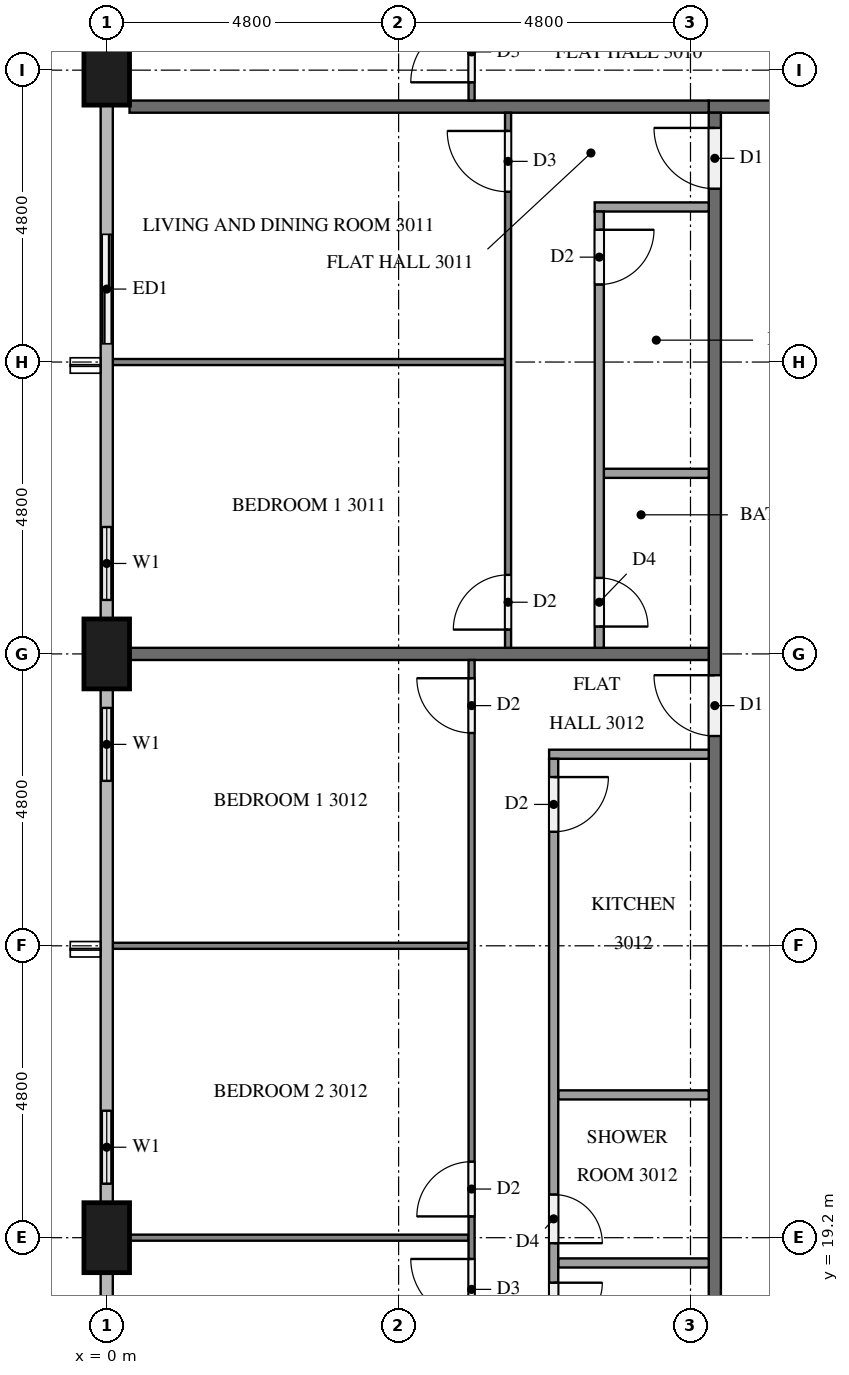
"""IFC4 building model, lengths in metres.
Left out: names, types, materials, properties, quantities, classifications, styles, units other than length and angle.
Written with IfcOpenShell. Run it as: python <this file> out.ifc"""

import sys

from ifc_helpers import new_model, si_unit, direction, frame, frame_2d, origin, origin_2d, place, context, subcontext, project, spatial, rectangle, extrude, element, fill, save


model = new_model("IFC4")
c1 = context("Model", 3, precision=1e-05, world=origin(), true_north=direction((0.0, 1.0)))
c2 = subcontext(c1, "Body", "Model", "MODEL_VIEW")
j1 = project(units=[si_unit("LENGTHUNIT", "METRE"), si_unit("PLANEANGLEUNIT", "RADIAN")], contexts=[c1])
p1 = place(None, origin())
s1 = spatial("IfcSite", under=j1, at=p1, CompositionType="ELEMENT")
p2 = place(p1, origin())
s2 = spatial("IfcBuilding", under=s1, at=p2, CompositionType="ELEMENT")
p3 = place(p2, frame((0.0, 0.0, 119.1)))
s3 = spatial("IfcBuildingStorey", under=s2, at=p3, CompositionType="ELEMENT", Elevation=119.1)
for number, where, z_axis, x_axis in (
    (1, (0.0, 38.4, 0.0), (0.0, 0.0, 1.0), (0.0, 1.0, 0.0)),
    (2, (0.0, 28.8, 0.0), (0.0, 0.0, 1.0), (0.0, 1.0, 0.0)),
    (3, (0.0, 19.2, 0.0), (0.0, 0.0, 1.0), (0.0, 1.0, 0.0)),
):
    element("IfcColumn", number, at=place(p3, frame(where, z_axis=z_axis, x_axis=x_axis)), inside=s3, PredefinedType="COLUMN", context=c2, shape_type="SweptSolid", body=[
        extrude(rectangle(XDim=1.15, YDim=0.75, at=origin_2d()), origin(), (0.0, 0.0, 1.0), 3.2),
    ])
p4 = place(p3, frame((0.0, 36.0, 0.0), z_axis=(0.0, 0.0, 1.0), x_axis=(0.0, -1.0, 0.0)))
e4 = element("IfcWall", 4, at=p4, inside=s3, PredefinedType="SOLIDWALL", context=c2, shape_type="SweptSolid", body=[
    extrude(rectangle(XDim=2.4, YDim=0.15, at=frame_2d((1.2, 0.0))), origin(), (0.0, 0.0, 1.0), 3.2),
])
p5 = place(p4, frame((0.3, 0.0, 0.0)))
e5 = element("IfcOpeningElement", 5, at=p5, cuts=e4, PredefinedType="OPENING", context=c2, shape_type="SweptSolid", body=[
    extrude(rectangle(XDim=1.8, YDim=2.4, at=frame_2d((0.9, 1.2))), frame((0.0, 0.085, 0.0), z_axis=(0.0, -1.0, 0.0), x_axis=(1.0, 0.0, 0.0)), (0.0, 0.0, 1.0), 0.17),
])
p6 = place(p3, frame((0.0, 31.2, 0.0), z_axis=(0.0, 0.0, 1.0), x_axis=(0.0, -1.0, 0.0)))
e6 = element("IfcWall", 6, at=p6, inside=s3, PredefinedType="SOLIDWALL", context=c2, shape_type="SweptSolid", body=[
    extrude(rectangle(XDim=1.825, YDim=0.15, at=frame_2d((0.913, 0.0))), origin(), (0.0, 0.0, 1.0), 3.2),
])
p7 = place(p6, frame((0.312, 0.0, 0.9)))
e7 = element("IfcOpeningElement", 7, at=p7, cuts=e6, PredefinedType="OPENING", context=c2, shape_type="SweptSolid", body=[
    extrude(rectangle(XDim=1.2, YDim=1.4, at=frame_2d((0.6, 0.7))), frame((0.0, 0.085, 0.0), z_axis=(0.0, -1.0, 0.0), x_axis=(1.0, 0.0, 0.0)), (0.0, 0.0, 1.0), 0.17),
])
p8 = place(p3, frame((0.0, 28.225, 0.0), z_axis=(0.0, 0.0, 1.0), x_axis=(0.0, -1.0, 0.0)))
e8 = element("IfcWall", 8, at=p8, inside=s3, PredefinedType="SOLIDWALL", context=c2, shape_type="SweptSolid", body=[
    extrude(rectangle(XDim=1.825, YDim=0.15, at=frame_2d((0.913, 0.0))), origin(), (0.0, 0.0, 1.0), 3.2),
])
p9 = place(p8, frame((0.312, 0.0, 0.9)))
e9 = element("IfcOpeningElement", 9, at=p9, cuts=e8, PredefinedType="OPENING", context=c2, shape_type="SweptSolid", body=[
    extrude(rectangle(XDim=1.2, YDim=1.4, at=frame_2d((0.6, 0.7))), frame((0.0, 0.085, 0.0), z_axis=(0.0, -1.0, 0.0), x_axis=(1.0, 0.0, 0.0)), (0.0, 0.0, 1.0), 0.17),
])
p10 = place(p3, frame((0.0, 21.6, 0.0), z_axis=(0.0, 0.0, 1.0), x_axis=(0.0, -1.0, 0.0)))
e10 = element("IfcWall", 10, at=p10, inside=s3, PredefinedType="SOLIDWALL", context=c2, shape_type="SweptSolid", body=[
    extrude(rectangle(XDim=1.825, YDim=0.15, at=frame_2d((0.913, 0.0))), origin(), (0.0, 0.0, 1.0), 3.2),
])
p11 = place(p10, frame((0.312, 0.0, 0.9)))
e11 = element("IfcOpeningElement", 11, at=p11, cuts=e10, PredefinedType="OPENING", context=c2, shape_type="SweptSolid", body=[
    extrude(rectangle(XDim=1.2, YDim=1.4, at=frame_2d((0.6, 0.7))), frame((0.0, 0.085, 0.0), z_axis=(0.0, -1.0, 0.0), x_axis=(1.0, 0.0, 0.0)), (0.0, 0.0, 1.0), 0.17),
])
p12 = place(p3, frame((12.1, 37.8, 0.0), z_axis=(0.0, 0.0, 1.0), x_axis=(-1.0, 0.0, 0.0)))
e12 = element("IfcWall", 12, at=p12, inside=s3, PredefinedType="PARTITIONING", context=c2, shape_type="SweptSolid", body=[
    extrude(rectangle(XDim=2.2, YDim=0.2, at=frame_2d((1.1, 0.0))), origin(), (0.0, 0.0, 1.0), 3.2),
])
p13 = place(p3, frame((10.0, 15.1, 0.0), z_axis=(0.0, 0.0, 1.0), x_axis=(0.0, 1.0, 0.0)))
e13 = element("IfcWall", 13, at=p13, inside=s3, PredefinedType="PARTITIONING", context=c2, shape_type="SweptSolid", body=[
    extrude(rectangle(XDim=22.6, YDim=0.2, at=frame_2d((11.3, 0.0))), origin(), (0.0, 0.0, 1.0), 3.2),
])
p14 = place(p13, frame((21.35, 0.0, 0.0)))
e14 = element("IfcOpeningElement", 14, at=p14, cuts=e13, PredefinedType="OPENING", context=c2, shape_type="SweptSolid", body=[
    extrude(rectangle(XDim=1.0, YDim=2.1, at=frame_2d((0.5, 1.05))), frame((0.0, 0.11, 0.0), z_axis=(0.0, -1.0, 0.0), x_axis=(1.0, 0.0, 0.0)), (0.0, 0.0, 1.0), 0.22),
])
p15 = place(p13, frame((12.35, 0.0, 0.0)))
e15 = element("IfcOpeningElement", 15, at=p15, cuts=e13, PredefinedType="OPENING", context=c2, shape_type="SweptSolid", body=[
    extrude(rectangle(XDim=1.0, YDim=2.1, at=frame_2d((0.5, 1.05))), frame((0.0, 0.11, 0.0), z_axis=(0.0, -1.0, 0.0), x_axis=(1.0, 0.0, 0.0)), (0.0, 0.0, 1.0), 0.22),
])
for number, where, z_axis, x_axis in (
    (16, (0.375, 37.8, 0.0), (0.0, 0.0, 1.0), (1.0, 0.0, 0.0)),
    (17, (0.375, 28.8, 0.0), (0.0, 0.0, 1.0), (1.0, 0.0, 0.0)),
):
    element("IfcWall", number, at=place(p3, frame(where, z_axis=z_axis, x_axis=x_axis)), inside=s3, PredefinedType="PARTITIONING", context=c2, shape_type="SweptSolid", body=[
        extrude(rectangle(XDim=9.525, YDim=0.2, at=frame_2d((4.762, 0.0))), origin(), (0.0, 0.0, 1.0), 3.2),
    ])
p16 = place(p3, frame((6.0, 37.9, 0.0), z_axis=(0.0, 0.0, 1.0), x_axis=(0.0, 1.0, 0.0)))
e18 = element("IfcWall", 18, at=p16, inside=s3, PredefinedType="PARTITIONING", context=c2, shape_type="SweptSolid", body=[
    extrude(rectangle(XDim=14.8, YDim=0.1, at=frame_2d((7.4, 0.0))), origin(), (0.0, 0.0, 1.0), 3.2),
])
p17 = place(p16, frame((0.3, 0.0, 0.0)))
e19 = element("IfcOpeningElement", 19, at=p17, cuts=e18, PredefinedType="OPENING", context=c2, shape_type="SweptSolid", body=[
    extrude(rectangle(XDim=1.0, YDim=2.1, at=frame_2d((0.5, 1.05))), frame((0.0, 0.06, 0.0), z_axis=(0.0, -1.0, 0.0), x_axis=(1.0, 0.0, 0.0)), (0.0, 0.0, 1.0), 0.12),
])
p18 = place(p16, frame((8.85, 0.0, 0.0)))
e20 = element("IfcOpeningElement", 20, at=p18, cuts=e18, PredefinedType="OPENING", context=c2, shape_type="SweptSolid", body=[
    extrude(rectangle(XDim=0.9, YDim=2.1, at=frame_2d((0.45, 1.05))), frame((0.0, 0.06, 0.0), z_axis=(0.0, -1.0, 0.0), x_axis=(1.0, 0.0, 0.0)), (0.0, 0.0, 1.0), 0.12),
])
p19 = place(p16, frame((10.45, 0.0, 0.0)))
e21 = element("IfcOpeningElement", 21, at=p19, cuts=e18, PredefinedType="OPENING", context=c2, shape_type="SweptSolid", body=[
    extrude(rectangle(XDim=0.9, YDim=2.1, at=frame_2d((0.45, 1.05))), frame((0.0, 0.06, 0.0), z_axis=(0.0, -1.0, 0.0), x_axis=(1.0, 0.0, 0.0)), (0.0, 0.0, 1.0), 0.12),
])
p20 = place(p3, frame((6.55, 33.6, 0.0), z_axis=(0.0, 0.0, 1.0), x_axis=(-1.0, 0.0, 0.0)))
e22 = element("IfcWall", 22, at=p20, inside=s3, PredefinedType="PARTITIONING", context=c2, shape_type="SweptSolid", body=[
    extrude(rectangle(XDim=6.45, YDim=0.1, at=frame_2d((3.225, 0.0))), origin(), (0.0, 0.0, 1.0), 3.2),
])
p21 = place(p3, frame((6.6, 28.9, 0.0), z_axis=(0.0, 0.0, 1.0), x_axis=(0.0, 1.0, 0.0)))
e23 = element("IfcWall", 23, at=p21, inside=s3, PredefinedType="PARTITIONING", context=c2, shape_type="SweptSolid", body=[
    extrude(rectangle(XDim=8.8, YDim=0.1, at=frame_2d((4.4, 0.0))), origin(), (0.0, 0.0, 1.0), 3.2),
])
p22 = place(p21, frame((7.5, 0.0, 0.0)))
e24 = element("IfcOpeningElement", 24, at=p22, cuts=e23, PredefinedType="OPENING", context=c2, shape_type="SweptSolid", body=[
    extrude(rectangle(XDim=1.0, YDim=2.1, at=frame_2d((0.5, 1.05))), frame((0.0, 0.06, 0.0), z_axis=(0.0, -1.0, 0.0), x_axis=(1.0, 0.0, 0.0)), (0.0, 0.0, 1.0), 0.12),
])
p23 = place(p21, frame((0.3, 0.0, 0.0)))
e25 = element("IfcOpeningElement", 25, at=p23, cuts=e23, PredefinedType="OPENING", context=c2, shape_type="SweptSolid", body=[
    extrude(rectangle(XDim=0.9, YDim=2.1, at=frame_2d((0.45, 1.05))), frame((0.0, 0.06, 0.0), z_axis=(0.0, -1.0, 0.0), x_axis=(1.0, 0.0, 0.0)), (0.0, 0.0, 1.0), 0.12),
])
p24 = place(p3, frame((9.9, 31.77, 0.0), z_axis=(0.0, 0.0, 1.0), x_axis=(-1.0, 0.0, 0.0)))
e26 = element("IfcWall", 26, at=p24, inside=s3, PredefinedType="PARTITIONING", context=c2, shape_type="SweptSolid", body=[
    extrude(rectangle(XDim=1.725, YDim=0.15, at=frame_2d((0.862, 0.0))), origin(), (0.0, 0.0, 1.0), 3.2),
])
p25 = place(p3, frame((9.9, 36.15, 0.0), z_axis=(0.0, 0.0, 1.0), x_axis=(-1.0, 0.0, 0.0)))
e27 = element("IfcWall", 27, at=p25, inside=s3, PredefinedType="PARTITIONING", context=c2, shape_type="SweptSolid", body=[
    extrude(rectangle(XDim=1.875, YDim=0.15, at=frame_2d((0.938, 0.0))), origin(), (0.0, 0.0, 1.0), 3.2),
])
p26 = place(p3, frame((8.1, 36.075, 0.0), z_axis=(0.0, 0.0, 1.0), x_axis=(0.0, -1.0, 0.0)))
e28 = element("IfcWall", 28, at=p26, inside=s3, PredefinedType="PARTITIONING", context=c2, shape_type="SweptSolid", body=[
    extrude(rectangle(XDim=7.175, YDim=0.15, at=frame_2d((3.587, 0.0))), origin(), (0.0, 0.0, 1.0), 3.2),
])
p27 = place(p26, frame((0.3, 0.0, 0.0)))
e29 = element("IfcOpeningElement", 29, at=p27, cuts=e28, PredefinedType="OPENING", context=c2, shape_type="SweptSolid", body=[
    extrude(rectangle(XDim=0.9, YDim=2.1, at=frame_2d((0.45, 1.05))), frame((0.0, 0.085, 0.0), z_axis=(0.0, -1.0, 0.0), x_axis=(1.0, 0.0, 0.0)), (0.0, 0.0, 1.0), 0.17),
])
p28 = place(p26, frame((6.025, 0.0, 0.0)))
e30 = element("IfcOpeningElement", 30, at=p28, cuts=e28, PredefinedType="OPENING", context=c2, shape_type="SweptSolid", body=[
    extrude(rectangle(XDim=0.8, YDim=2.1, at=frame_2d((0.4, 1.05))), frame((0.0, 0.085, 0.0), z_axis=(0.0, -1.0, 0.0), x_axis=(1.0, 0.0, 0.0)), (0.0, 0.0, 1.0), 0.17),
])
p29 = place(p3, frame((5.95, 24.0, 0.0), z_axis=(0.0, 0.0, 1.0), x_axis=(-1.0, 0.0, 0.0)))
e31 = element("IfcWall", 31, at=p29, inside=s3, PredefinedType="PARTITIONING", context=c2, shape_type="SweptSolid", body=[
    extrude(rectangle(XDim=5.85, YDim=0.1, at=frame_2d((2.925, 0.0))), origin(), (0.0, 0.0, 1.0), 3.2),
])
p30 = place(p3, frame((5.95, 19.2, 0.0), z_axis=(0.0, 0.0, 1.0), x_axis=(-1.0, 0.0, 0.0)))
e32 = element("IfcWall", 32, at=p30, inside=s3, PredefinedType="PARTITIONING", context=c2, shape_type="SweptSolid", body=[
    extrude(rectangle(XDim=5.575, YDim=0.1, at=frame_2d((2.788, 0.0))), origin(), (0.0, 0.0, 1.0), 3.2),
])
p31 = place(p3, frame((6.0, 15.1, 0.0), z_axis=(0.0, 0.0, 1.0), x_axis=(0.0, 1.0, 0.0)))
e33 = element("IfcWall", 33, at=p31, inside=s3, PredefinedType="PARTITIONING", context=c2, shape_type="SweptSolid", body=[
    extrude(rectangle(XDim=13.6, YDim=0.1, at=frame_2d((6.8, 0.0))), origin(), (0.0, 0.0, 1.0), 3.2),
])
p32 = place(p31, frame((12.4, 0.0, 0.0)))
e34 = element("IfcOpeningElement", 34, at=p32, cuts=e33, PredefinedType="OPENING", context=c2, shape_type="SweptSolid", body=[
    extrude(rectangle(XDim=0.9, YDim=2.1, at=frame_2d((0.45, 1.05))), frame((0.0, 0.06, 0.0), z_axis=(0.0, -1.0, 0.0), x_axis=(1.0, 0.0, 0.0)), (0.0, 0.0, 1.0), 0.12),
])
p33 = place(p31, frame((4.45, 0.0, 0.0)))
e35 = element("IfcOpeningElement", 35, at=p33, cuts=e33, PredefinedType="OPENING", context=c2, shape_type="SweptSolid", body=[
    extrude(rectangle(XDim=0.9, YDim=2.1, at=frame_2d((0.45, 1.05))), frame((0.0, 0.06, 0.0), z_axis=(0.0, -1.0, 0.0), x_axis=(1.0, 0.0, 0.0)), (0.0, 0.0, 1.0), 0.12),
])
p34 = place(p31, frame((2.75, 0.0, 0.0)))
e36 = element("IfcOpeningElement", 36, at=p34, cuts=e33, PredefinedType="OPENING", context=c2, shape_type="SweptSolid", body=[
    extrude(rectangle(XDim=1.0, YDim=2.1, at=frame_2d((0.5, 1.05))), frame((0.0, 0.06, 0.0), z_axis=(0.0, -1.0, 0.0), x_axis=(1.0, 0.0, 0.0)), (0.0, 0.0, 1.0), 0.12),
])
for number, where, z_axis, x_axis in (
    (37, (9.9, 21.548, 0.0), (0.0, 0.0, 1.0), (-1.0, 0.0, 0.0)),
    (38, (9.9, 18.785, 0.0), (0.0, 0.0, 1.0), (-1.0, 0.0, 0.0)),
):
    element("IfcWall", number, at=place(p3, frame(where, z_axis=z_axis, x_axis=x_axis)), inside=s3, PredefinedType="PARTITIONING", context=c2, shape_type="SweptSolid", body=[
        extrude(rectangle(XDim=2.475, YDim=0.15, at=frame_2d((1.237, 0.0))), origin(), (0.0, 0.0, 1.0), 3.2),
    ])
p35 = place(p3, frame((9.9, 27.15, 0.0), z_axis=(0.0, 0.0, 1.0), x_axis=(-1.0, 0.0, 0.0)))
e39 = element("IfcWall", 39, at=p35, inside=s3, PredefinedType="PARTITIONING", context=c2, shape_type="SweptSolid", body=[
    extrude(rectangle(XDim=2.625, YDim=0.15, at=frame_2d((1.312, 0.0))), origin(), (0.0, 0.0, 1.0), 3.2),
])
p36 = place(p3, frame((7.35, 27.075, 0.0), z_axis=(0.0, 0.0, 1.0), x_axis=(0.0, -1.0, 0.0)))
e40 = element("IfcWall", 40, at=p36, inside=s3, PredefinedType="PARTITIONING", context=c2, shape_type="SweptSolid", body=[
    extrude(rectangle(XDim=11.975, YDim=0.15, at=frame_2d((5.987, 0.0))), origin(), (0.0, 0.0, 1.0), 3.2),
])
p37 = place(p36, frame((0.3, 0.0, 0.0)))
e41 = element("IfcOpeningElement", 41, at=p37, cuts=e40, PredefinedType="OPENING", context=c2, shape_type="SweptSolid", body=[
    extrude(rectangle(XDim=0.9, YDim=2.1, at=frame_2d((0.45, 1.05))), frame((0.0, 0.085, 0.0), z_axis=(0.0, -1.0, 0.0), x_axis=(1.0, 0.0, 0.0)), (0.0, 0.0, 1.0), 0.17),
])
p38 = place(p36, frame((7.165, 0.0, 0.0)))
e42 = element("IfcOpeningElement", 42, at=p38, cuts=e40, PredefinedType="OPENING", context=c2, shape_type="SweptSolid", body=[
    extrude(rectangle(XDim=0.8, YDim=2.1, at=frame_2d((0.4, 1.05))), frame((0.0, 0.085, 0.0), z_axis=(0.0, -1.0, 0.0), x_axis=(1.0, 0.0, 0.0)), (0.0, 0.0, 1.0), 0.17),
])
p39 = place(p36, frame((8.615, 0.0, 0.0)))
e43 = element("IfcOpeningElement", 43, at=p39, cuts=e40, PredefinedType="OPENING", context=c2, shape_type="SweptSolid", body=[
    extrude(rectangle(XDim=0.8, YDim=2.1, at=frame_2d((0.4, 1.05))), frame((0.0, 0.085, 0.0), z_axis=(0.0, -1.0, 0.0), x_axis=(1.0, 0.0, 0.0)), (0.0, 0.0, 1.0), 0.17),
])
p40 = place(p5, origin())
e44 = element("IfcDoor", 44, at=p40, inside=s3, OperationType="SLIDING_TO_LEFT", PredefinedType="DOOR", context=c2, shape_type="SweptSolid", body=[
    extrude(rectangle(XDim=1.8, YDim=2.4, at=frame_2d((0.9, 1.2))), frame((0.0, 0.025, 0.0), z_axis=(0.0, -1.0, 0.0), x_axis=(1.0, 0.0, 0.0)), (0.0, 0.0, 1.0), 0.05),
])
fill(e5, e44)
p41 = place(p7, origin())
e45 = element("IfcWindow", 45, at=p41, inside=s3, PartitioningType="SINGLE_PANEL", PredefinedType="WINDOW", context=c2, shape_type="SweptSolid", body=[
    extrude(rectangle(XDim=1.2, YDim=1.4, at=frame_2d((0.6, 0.7))), frame((0.0, 0.03, 0.0), z_axis=(0.0, -1.0, 0.0), x_axis=(1.0, 0.0, 0.0)), (0.0, 0.0, 1.0), 0.06),
])
fill(e7, e45)
p42 = place(p9, origin())
e46 = element("IfcWindow", 46, at=p42, inside=s3, PartitioningType="SINGLE_PANEL", PredefinedType="WINDOW", context=c2, shape_type="SweptSolid", body=[
    extrude(rectangle(XDim=1.2, YDim=1.4, at=frame_2d((0.6, 0.7))), frame((0.0, 0.03, 0.0), z_axis=(0.0, -1.0, 0.0), x_axis=(1.0, 0.0, 0.0)), (0.0, 0.0, 1.0), 0.06),
])
fill(e9, e46)
p43 = place(p11, origin())
e47 = element("IfcWindow", 47, at=p43, inside=s3, PartitioningType="SINGLE_PANEL", PredefinedType="WINDOW", context=c2, shape_type="SweptSolid", body=[
    extrude(rectangle(XDim=1.2, YDim=1.4, at=frame_2d((0.6, 0.7))), frame((0.0, 0.03, 0.0), z_axis=(0.0, -1.0, 0.0), x_axis=(1.0, 0.0, 0.0)), (0.0, 0.0, 1.0), 0.06),
])
fill(e11, e47)
p44 = place(p14, origin())
e48 = element("IfcDoor", 48, at=p44, inside=s3, OperationType="SINGLE_SWING_RIGHT", PredefinedType="DOOR", context=c2, shape_type="SweptSolid", body=[
    extrude(rectangle(XDim=1.0, YDim=2.1, at=frame_2d((0.5, 1.05))), frame((0.0, 0.025, 0.0), z_axis=(0.0, -1.0, 0.0), x_axis=(1.0, 0.0, 0.0)), (0.0, 0.0, 1.0), 0.05),
])
fill(e14, e48)
p45 = place(p15, origin())
e49 = element("IfcDoor", 49, at=p45, inside=s3, OperationType="SINGLE_SWING_RIGHT", PredefinedType="DOOR", context=c2, shape_type="SweptSolid", body=[
    extrude(rectangle(XDim=1.0, YDim=2.1, at=frame_2d((0.5, 1.05))), frame((0.0, 0.025, 0.0), z_axis=(0.0, -1.0, 0.0), x_axis=(1.0, 0.0, 0.0)), (0.0, 0.0, 1.0), 0.05),
])
fill(e15, e49)
p46 = place(p17, origin())
e50 = element("IfcDoor", 50, at=p46, inside=s3, OperationType="SINGLE_SWING_LEFT", PredefinedType="DOOR", context=c2, shape_type="SweptSolid", body=[
    extrude(rectangle(XDim=1.0, YDim=2.1, at=frame_2d((0.5, 1.05))), frame((0.0, 0.025, 0.0), z_axis=(0.0, -1.0, 0.0), x_axis=(1.0, 0.0, 0.0)), (0.0, 0.0, 1.0), 0.05),
])
fill(e19, e50)
p47 = place(p22, origin())
e51 = element("IfcDoor", 51, at=p47, inside=s3, OperationType="SINGLE_SWING_RIGHT", PredefinedType="DOOR", context=c2, shape_type="SweptSolid", body=[
    extrude(rectangle(XDim=1.0, YDim=2.1, at=frame_2d((0.5, 1.05))), frame((0.0, 0.025, 0.0), z_axis=(0.0, -1.0, 0.0), x_axis=(1.0, 0.0, 0.0)), (0.0, 0.0, 1.0), 0.05),
])
fill(e24, e51)
p48 = place(p23, origin())
e52 = element("IfcDoor", 52, at=p48, inside=s3, OperationType="SINGLE_SWING_LEFT", PredefinedType="DOOR", context=c2, shape_type="SweptSolid", body=[
    extrude(rectangle(XDim=0.9, YDim=2.1, at=frame_2d((0.45, 1.05))), frame((0.0, 0.025, 0.0), z_axis=(0.0, -1.0, 0.0), x_axis=(1.0, 0.0, 0.0)), (0.0, 0.0, 1.0), 0.05),
])
fill(e25, e52)
p49 = place(p27, origin())
e53 = element("IfcDoor", 53, at=p49, inside=s3, OperationType="SINGLE_SWING_LEFT", PredefinedType="DOOR", context=c2, shape_type="SweptSolid", body=[
    extrude(rectangle(XDim=0.9, YDim=2.1, at=frame_2d((0.45, 1.05))), frame((0.0, 0.025, 0.0), z_axis=(0.0, -1.0, 0.0), x_axis=(1.0, 0.0, 0.0)), (0.0, 0.0, 1.0), 0.05),
])
fill(e29, e53)
p50 = place(p28, origin())
e54 = element("IfcDoor", 54, at=p50, inside=s3, OperationType="SINGLE_SWING_RIGHT", PredefinedType="DOOR", context=c2, shape_type="SweptSolid", body=[
    extrude(rectangle(XDim=0.8, YDim=2.1, at=frame_2d((0.4, 1.05))), frame((0.0, 0.025, 0.0), z_axis=(0.0, -1.0, 0.0), x_axis=(1.0, 0.0, 0.0)), (0.0, 0.0, 1.0), 0.05),
])
fill(e30, e54)
p51 = place(p32, origin())
e55 = element("IfcDoor", 55, at=p51, inside=s3, OperationType="SINGLE_SWING_RIGHT", PredefinedType="DOOR", context=c2, shape_type="SweptSolid", body=[
    extrude(rectangle(XDim=0.9, YDim=2.1, at=frame_2d((0.45, 1.05))), frame((0.0, 0.025, 0.0), z_axis=(0.0, -1.0, 0.0), x_axis=(1.0, 0.0, 0.0)), (0.0, 0.0, 1.0), 0.05),
])
fill(e34, e55)
p52 = place(p33, origin())
e56 = element("IfcDoor", 56, at=p52, inside=s3, OperationType="SINGLE_SWING_LEFT", PredefinedType="DOOR", context=c2, shape_type="SweptSolid", body=[
    extrude(rectangle(XDim=0.9, YDim=2.1, at=frame_2d((0.45, 1.05))), frame((0.0, 0.025, 0.0), z_axis=(0.0, -1.0, 0.0), x_axis=(1.0, 0.0, 0.0)), (0.0, 0.0, 1.0), 0.05),
])
fill(e35, e56)
p53 = place(p34, origin())
e57 = element("IfcDoor", 57, at=p53, inside=s3, OperationType="SINGLE_SWING_RIGHT", PredefinedType="DOOR", context=c2, shape_type="SweptSolid", body=[
    extrude(rectangle(XDim=1.0, YDim=2.1, at=frame_2d((0.5, 1.05))), frame((0.0, 0.025, 0.0), z_axis=(0.0, -1.0, 0.0), x_axis=(1.0, 0.0, 0.0)), (0.0, 0.0, 1.0), 0.05),
])
fill(e36, e57)
p54 = place(p37, origin())
e58 = element("IfcDoor", 58, at=p54, inside=s3, OperationType="SINGLE_SWING_LEFT", PredefinedType="DOOR", context=c2, shape_type="SweptSolid", body=[
    extrude(rectangle(XDim=0.9, YDim=2.1, at=frame_2d((0.45, 1.05))), frame((0.0, 0.025, 0.0), z_axis=(0.0, -1.0, 0.0), x_axis=(1.0, 0.0, 0.0)), (0.0, 0.0, 1.0), 0.05),
])
fill(e41, e58)
p55 = place(p38, origin())
e59 = element("IfcDoor", 59, at=p55, inside=s3, OperationType="SINGLE_SWING_RIGHT", PredefinedType="DOOR", context=c2, shape_type="SweptSolid", body=[
    extrude(rectangle(XDim=0.8, YDim=2.1, at=frame_2d((0.4, 1.05))), frame((0.0, 0.025, 0.0), z_axis=(0.0, -1.0, 0.0), x_axis=(1.0, 0.0, 0.0)), (0.0, 0.0, 1.0), 0.05),
])
fill(e42, e59)
p56 = place(p39, origin())
e60 = element("IfcDoor", 60, at=p56, inside=s3, OperationType="SINGLE_SWING_LEFT", PredefinedType="DOOR", context=c2, shape_type="SweptSolid", body=[
    extrude(rectangle(XDim=0.8, YDim=2.1, at=frame_2d((0.4, 1.05))), frame((0.0, 0.025, 0.0), z_axis=(0.0, -1.0, 0.0), x_axis=(1.0, 0.0, 0.0)), (0.0, 0.0, 1.0), 0.05),
])
fill(e43, e60)
save(model, sys.argv[1])
